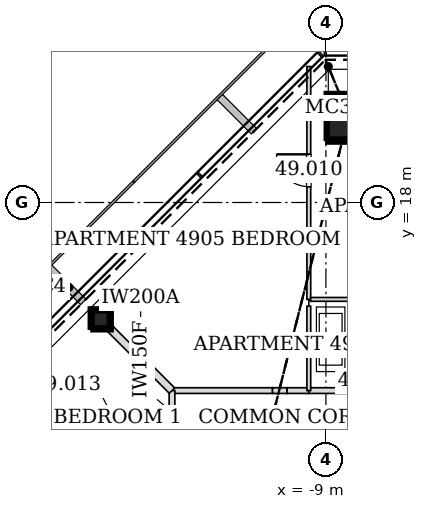
"""IFC4 building model, lengths in metres.
Left out: names, types, materials, properties, quantities, classifications, styles, units other than length and angle.
Written with IfcOpenShell. Run it as: python <this file> out.ifc"""

import sys

from ifc_helpers import new_model, si_unit, direction, frame, frame_2d, origin, origin_2d, place, context, subcontext, project, spatial, rectangle, hollow_rectangle, extrude, element, fill, save


model = new_model("IFC4")
c1 = context("Model", 3, precision=1e-05, world=origin(), true_north=direction((0.0, 1.0)))
c2 = subcontext(c1, "Body", "Model", "MODEL_VIEW")
j1 = project(units=[si_unit("LENGTHUNIT", "METRE"), si_unit("PLANEANGLEUNIT", "RADIAN")], contexts=[c1])
p1 = place(None, origin())
s1 = spatial("IfcSite", under=j1, at=p1, CompositionType="ELEMENT")
p2 = place(p1, origin())
s2 = spatial("IfcBuilding", under=s1, at=p2, CompositionType="ELEMENT")
p3 = place(p2, frame((0.0, 0.0, 214.2)))
s3 = spatial("IfcBuildingStorey", under=s2, at=p3, CompositionType="ELEMENT", Elevation=214.2)
p4 = place(p3, frame((-8.399, 20.277, 0.0), z_axis=(0.011770162649, -0.02827709807, 0.999530824435), x_axis=(0.923215513192, 0.3842825994, 0.0)))
e1 = element("IfcColumn", 1, at=p4, inside=s3, PredefinedType="COLUMN", context=c2, shape_type="SweptSolid", body=[
    extrude(hollow_rectangle(XDim=1.2, YDim=1.2, WallThickness=0.055, at=origin_2d()), origin(), (0.0, 0.0, 1.0), 3.402),
])
p5 = place(p3, frame((-14.959, 14.959, 0.0), z_axis=(0.019953277583, -0.019953277583, 0.999601787427), x_axis=(0.707106781187, 0.707106781187, 0.0)))
e2 = element("IfcColumn", 2, at=p5, inside=s3, PredefinedType="COLUMN", context=c2, shape_type="SweptSolid", body=[
    extrude(hollow_rectangle(XDim=0.5, YDim=0.5, WallThickness=0.025, at=origin_2d()), origin(), (0.0, 0.0, 1.0), 3.402),
])
p6 = place(p3, frame((-9.449, 13.05, 0.0), z_axis=(0.0, 0.0, 1.0), x_axis=(-1.0, 0.0, 0.0)))
e3 = element("IfcWall", 3, at=p6, inside=s3, PredefinedType="PARTITIONING", context=c2, shape_type="SweptSolid", body=[
    extrude(rectangle(XDim=0.578, YDim=0.15, at=frame_2d((0.289, 0.0))), origin(), (0.0, 0.0, 1.0), 3.2),
])
p7 = place(p3, frame((-10.404, 13.05, 0.0), z_axis=(0.0, 0.0, 1.0), x_axis=(-1.0, 0.0, 0.0)))
e4 = element("IfcWall", 4, at=p7, inside=s3, PredefinedType="PARTITIONING", context=c2, shape_type="SweptSolid", body=[
    extrude(rectangle(XDim=2.646, YDim=0.15, at=frame_2d((1.323, 0.0))), origin(), (0.0, 0.0, 1.0), 2.578),
])
p8 = place(p3, frame((-10.027, 13.05, 0.0), z_axis=(0.0, 0.0, 1.0), x_axis=(-1.0, 0.0, 0.0)))
e5 = element("IfcWall", 5, at=p8, inside=s3, PredefinedType="PARTITIONING", context=c2, shape_type="SweptSolid", body=[
    extrude(rectangle(XDim=0.377, YDim=0.15, at=frame_2d((0.188, 0.0))), origin(), (0.0, 0.0, 1.0), 2.268),
])
p9 = place(p3, frame((-7.249, 13.05, 0.0), z_axis=(0.0, 0.0, 1.0), x_axis=(-1.0, 0.0, 0.0)))
e6 = element("IfcWall", 6, at=p9, inside=s3, PredefinedType="PARTITIONING", context=c2, shape_type="SweptSolid", body=[
    extrude(rectangle(XDim=2.202, YDim=0.15, at=frame_2d((1.101, 0.0))), origin(), (0.0, 0.0, 1.0), 3.2),
])
p10 = place(p3, frame((-13.05, 13.05, 0.0), z_axis=(0.0, 0.0, 1.0), x_axis=(0.0, -1.0, 0.0)))
e7 = element("IfcWall", 7, at=p10, inside=s3, PredefinedType="PARTITIONING", context=c2, shape_type="SweptSolid", body=[
    extrude(rectangle(XDim=1.401, YDim=0.15, at=frame_2d((0.701, 0.0))), origin(), (0.0, 0.0, 1.0), 2.578),
])
p11 = place(p3, frame((-9.45, 13.05, 0.0), z_axis=(0.0, 0.0, 1.0), x_axis=(0.0, 1.0, 0.0)))
e8 = element("IfcWall", 8, at=p11, inside=s3, PredefinedType="PARTITIONING", context=c2, shape_type="SweptSolid", body=[
    extrude(rectangle(XDim=2.221, YDim=0.1, at=frame_2d((1.111, 0.0))), origin(), (0.0, 0.0, 1.0), 2.591),
])
p12 = place(p3, frame((-9.45, 16.722, 0.0), z_axis=(0.0, 0.0, 1.0), x_axis=(0.0, 1.0, 0.0)))
e9 = element("IfcWall", 9, at=p12, inside=s3, PredefinedType="PARTITIONING", context=c2, shape_type="SweptSolid", body=[
    extrude(rectangle(XDim=4.855, YDim=0.1, at=frame_2d((2.428, 0.0))), origin(), (0.0, 0.0, 1.0), 2.784),
])
p13 = place(p12, frame((1.695, 0.0, 0.0)))
e10 = element("IfcOpeningElement", 10, at=p13, cuts=e9, PredefinedType="OPENING", context=c2, shape_type="SweptSolid", body=[
    extrude(rectangle(XDim=0.85, YDim=2.1, at=frame_2d((0.425, 1.05))), frame((0.0, 0.06, 0.0), z_axis=(0.0, -1.0, 0.0), x_axis=(1.0, 0.0, 0.0)), (0.0, 0.0, 1.0), 0.12),
])
p14 = place(p3, frame((-9.45, 15.449, 0.0), z_axis=(0.0, 0.0, 1.0), x_axis=(0.0, 1.0, 0.0)))
e11 = element("IfcWall", 11, at=p14, inside=s3, PredefinedType="PARTITIONING", context=c2, shape_type="SweptSolid", body=[
    extrude(rectangle(XDim=1.273, YDim=0.1, at=frame_2d((0.637, 0.0))), origin(), (0.0, 0.0, 1.0), 2.268),
])
p15 = place(p3, frame((-14.701, 14.701, 0.0), z_axis=(0.0, 0.0, 1.0), x_axis=(0.707106781187, -0.707106781187, 0.0)))
e12 = element("IfcWall", 12, at=p15, inside=s3, PredefinedType="PARTITIONING", context=c2, shape_type="SweptSolid", body=[
    extrude(rectangle(XDim=2.334, YDim=0.2, at=frame_2d((1.167, 0.0))), origin(), (0.0, 0.0, 1.0), 2.578),
])
p16 = place(p3, frame((-7.25, 15.45, 0.0), z_axis=(0.0, 0.0, 1.0), x_axis=(-1.0, 0.0, 0.0)))
e13 = element("IfcWall", 13, at=p16, inside=s3, PredefinedType="PARTITIONING", context=c2, shape_type="SweptSolid", body=[
    extrude(rectangle(XDim=2.154, YDim=0.1, at=frame_2d((1.077, 0.0))), origin(), (0.0, 0.0, 1.0), 3.2),
])
p17 = place(p13, origin())
e14 = element("IfcDoor", 14, at=p17, inside=s3, OperationType="SINGLE_SWING_RIGHT", PredefinedType="DOOR", context=c2, shape_type="SweptSolid", body=[
    extrude(rectangle(XDim=0.85, YDim=2.1, at=frame_2d((0.425, 1.05))), frame((0.0, 0.025, 0.0), z_axis=(0.0, -1.0, 0.0), x_axis=(1.0, 0.0, 0.0)), (0.0, 0.0, 1.0), 0.05),
])
fill(e10, e14)
save(model, sys.argv[1])
